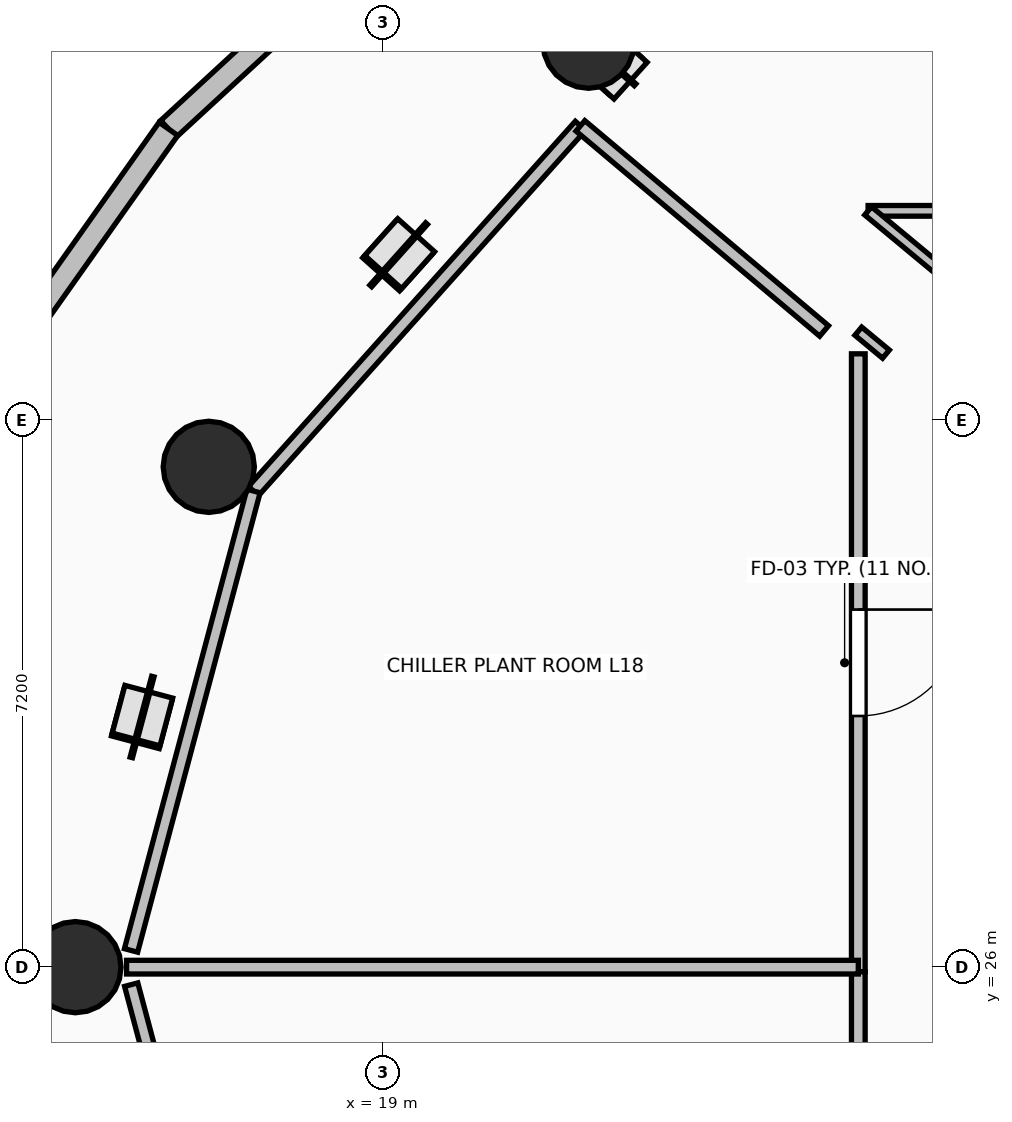
"""IFC4 building model, lengths in metres.
Left out: names, types, materials, properties, quantities, classifications, styles, units other than length and angle.
Written with IfcOpenShell. Run it as: python <this file> out.ifc"""

import sys

from ifc_helpers import new_model, si_unit, direction, frame, frame_2d, origin, origin_2d, place, context, subcontext, project, spatial, rectangle, circle, extrude, element, fill, save


model = new_model("IFC4")
c1 = context("Model", 3, precision=1e-05, world=origin(), true_north=direction((0.0, 1.0)))
c2 = subcontext(c1, "Body", "Model", "MODEL_VIEW")
j1 = project(units=[si_unit("LENGTHUNIT", "METRE"), si_unit("PLANEANGLEUNIT", "RADIAN")], contexts=[c1])
p1 = place(None, origin())
s1 = spatial("IfcSite", under=j1, at=p1, CompositionType="ELEMENT")
p2 = place(p1, origin())
s2 = spatial("IfcBuilding", under=s1, at=p2, CompositionType="ELEMENT")
p3 = place(p2, frame((0.0, 0.0, 69.5)))
s3 = spatial("IfcBuildingStorey", under=s2, at=p3, CompositionType="ELEMENT", Elevation=69.5)
for number, where, z_axis, x_axis in (
    (1, (21.701, 38.162, 0.0), (0.0, 0.0, 1.0), (-0.707, 0.707, 0.0)),
    (2, (16.705, 32.582, 0.0), (0.0, 0.0, 1.0), (-0.924, 0.383, 0.0)),
    (3, (14.95, 26.0, 0.0), (0.0, 0.0, 1.0), (-1.0, 0.0, 0.0)),
):
    element("IfcColumn", number, at=place(p3, frame(where, z_axis=z_axis, x_axis=x_axis)), inside=s3, PredefinedType="COLUMN", context=c2, shape_type="SweptSolid", body=[
        extrude(circle(Radius=0.6, at=origin_2d()), origin(), (0.0, 0.0, 1.0), 4.8),
    ])
p4 = place(p3, frame((19.438, 40.036, 0.0), z_axis=(0.0, 0.0, 1.0), x_axis=(-0.735416718093, -0.677615119924, 0.0)))
e4 = element("IfcWall", 4, at=p4, inside=s3, PredefinedType="STANDARD", context=c2, shape_type="SweptSolid", body=[
    extrude(rectangle(XDim=4.439, YDim=0.3, at=frame_2d((2.22, 0.0))), origin(), (0.0, 0.0, 1.0), 4.5),
])
p5 = place(p3, frame((16.174, 37.028, 0.0), z_axis=(0.0, 0.0, 1.0), x_axis=(-0.57716435238, -0.81662801222, 0.0)))
e5 = element("IfcWall", 5, at=p5, inside=s3, PredefinedType="STANDARD", context=c2, shape_type="SweptSolid", body=[
    extrude(rectangle(XDim=4.202, YDim=0.3, at=frame_2d((2.101, 0.0))), origin(), (0.0, 0.0, 1.0), 4.5),
])
p6 = place(p3, frame((25.25, 34.069, 0.0), z_axis=(0.0, 0.0, 1.0), x_axis=(0.0, -1.0, 0.0)))
e6 = element("IfcWall", 6, at=p6, inside=s3, PredefinedType="PARTITIONING", context=c2, shape_type="SweptSolid", body=[
    extrude(rectangle(XDim=8.129, YDim=0.18, at=frame_2d((4.064, 0.0))), origin(), (0.0, 0.0, 1.0), 3.482),
])
p7 = place(p6, frame((3.365, 0.0, 0.0)))
e7 = element("IfcOpeningElement", 7, at=p7, cuts=e6, PredefinedType="OPENING", context=c2, shape_type="SweptSolid", body=[
    extrude(rectangle(XDim=1.4, YDim=2.2, at=frame_2d((0.7, 1.1))), frame((0.0, 0.105, 0.0), z_axis=(0.0, -1.0, 0.0), x_axis=(1.0, 0.0, 0.0)), (0.0, 0.0, 1.0), 0.21),
])
p8 = place(p3, frame((25.25, 25.94, 0.0), z_axis=(0.0, 0.0, 1.0), x_axis=(0.0, -1.0, 0.0)))
e8 = element("IfcWall", 8, at=p8, inside=s3, PredefinedType="PARTITIONING", context=c2, shape_type="SweptSolid", body=[
    extrude(rectangle(XDim=8.164, YDim=0.18, at=frame_2d((4.082, 0.0))), origin(), (0.0, 0.0, 1.0), 4.5),
])
p9 = place(p8, frame((3.382, 0.0, 0.0)))
e9 = element("IfcOpeningElement", 9, at=p9, cuts=e8, PredefinedType="OPENING", context=c2, shape_type="SweptSolid", body=[
    extrude(rectangle(XDim=1.4, YDim=2.2, at=frame_2d((0.7, 1.1))), frame((0.0, 0.105, 0.0), z_axis=(0.0, -1.0, 0.0), x_axis=(1.0, 0.0, 0.0)), (0.0, 0.0, 1.0), 0.21),
])
p10 = place(p3, frame((15.623, 26.0, 0.0), z_axis=(0.0, 0.0, 1.0), x_axis=(1.0, 0.0, 0.0)))
e10 = element("IfcWall", 10, at=p10, inside=s3, PredefinedType="PARTITIONING", context=c2, shape_type="SweptSolid", body=[
    extrude(rectangle(XDim=9.627, YDim=0.18, at=frame_2d((4.813, 0.0))), origin(), (0.0, 0.0, 1.0), 3.482),
])
p11 = place(p3, frame((33.594, 35.95, 0.0), z_axis=(0.0, 0.0, 1.0), x_axis=(-1.0, 0.0, 0.0)))
e11 = element("IfcWall", 11, at=p11, inside=s3, PredefinedType="PARTITIONING", context=c2, shape_type="SweptSolid", body=[
    extrude(rectangle(XDim=8.215, YDim=0.14, at=frame_2d((4.107, 0.0))), origin(), (0.0, 0.0, 1.0), 3.482),
])
p12 = place(p3, frame((25.379, 35.95, 0.0), z_axis=(0.0, 0.0, 1.0), x_axis=(0.769447461533, -0.638710109471, 0.0)))
e12 = element("IfcWall", 12, at=p12, inside=s3, PredefinedType="PARTITIONING", context=c2, shape_type="SweptSolid", body=[
    extrude(rectangle(XDim=1.386, YDim=0.14, at=frame_2d((0.693, 0.0))), origin(), (0.0, 0.0, 1.0), 4.134),
])
p13 = place(p3, frame((25.614, 34.065, 0.0), z_axis=(0.0, 0.0, 1.0), x_axis=(-0.769615661333, 0.638507426606, 0.0)))
e13 = element("IfcWall", 13, at=p13, inside=s3, PredefinedType="PARTITIONING", context=c2, shape_type="SweptSolid", body=[
    extrude(rectangle(XDim=0.473, YDim=0.14, at=frame_2d((0.236, 0.0))), origin(), (0.0, 0.0, 1.0), 4.134),
])
p14 = place(p3, frame((21.594, 37.068, 0.0), z_axis=(0.0, 0.0, 1.0), x_axis=(-0.667012857152, -0.745046205543, 0.0)))
e14 = element("IfcWall", 14, at=p14, inside=s3, PredefinedType="PARTITIONING", context=c2, shape_type="SweptSolid", body=[
    extrude(rectangle(XDim=6.448, YDim=0.18, at=frame_2d((3.224, 0.0))), origin(), (0.0, 0.0, 1.0), 3.482),
])
p15 = place(p3, frame((17.293, 32.264, 0.0), z_axis=(0.0, 0.0, 1.0), x_axis=(-0.257567905164, -0.966260200065, 0.0)))
e15 = element("IfcWall", 15, at=p15, inside=s3, PredefinedType="PARTITIONING", context=c2, shape_type="SweptSolid", body=[
    extrude(rectangle(XDim=6.255, YDim=0.18, at=frame_2d((3.127, 0.0))), origin(), (0.0, 0.0, 1.0), 3.482),
])
p16 = place(p3, frame((24.8, 34.37, 0.0), z_axis=(0.0, 0.0, 1.0), x_axis=(-0.765127214719, 0.643879138734, 0.0)))
e16 = element("IfcWall", 16, at=p16, inside=s3, PredefinedType="PARTITIONING", context=c2, shape_type="SweptSolid", body=[
    extrude(rectangle(XDim=4.19, YDim=0.18, at=frame_2d((2.095, 0.0))), origin(), (0.0, 0.0, 1.0), 4.189),
])
p17 = place(p3, frame((15.684, 25.77, 0.0), z_axis=(0.0, 0.0, 1.0), x_axis=(0.257638317277, -0.966241428149, 0.0)))
e17 = element("IfcWall", 17, at=p17, inside=s3, PredefinedType="PARTITIONING", context=c2, shape_type="SweptSolid", body=[
    extrude(rectangle(XDim=6.245, YDim=0.18, at=frame_2d((3.122, 0.0))), origin(), (0.0, 0.0, 1.0), 4.5),
])
p18 = place(p7, origin())
e18 = element("IfcDoor", 18, at=p18, inside=s3, OperationType="DOUBLE_SWING_LEFT", PredefinedType="DOOR", context=c2, shape_type="SweptSolid", body=[
    extrude(rectangle(XDim=1.4, YDim=2.2, at=frame_2d((0.7, 1.1))), frame((0.0, 0.025, 0.0), z_axis=(0.0, -1.0, 0.0), x_axis=(1.0, 0.0, 0.0)), (0.0, 0.0, 1.0), 0.05),
])
fill(e7, e18)
save(model, sys.argv[1])
